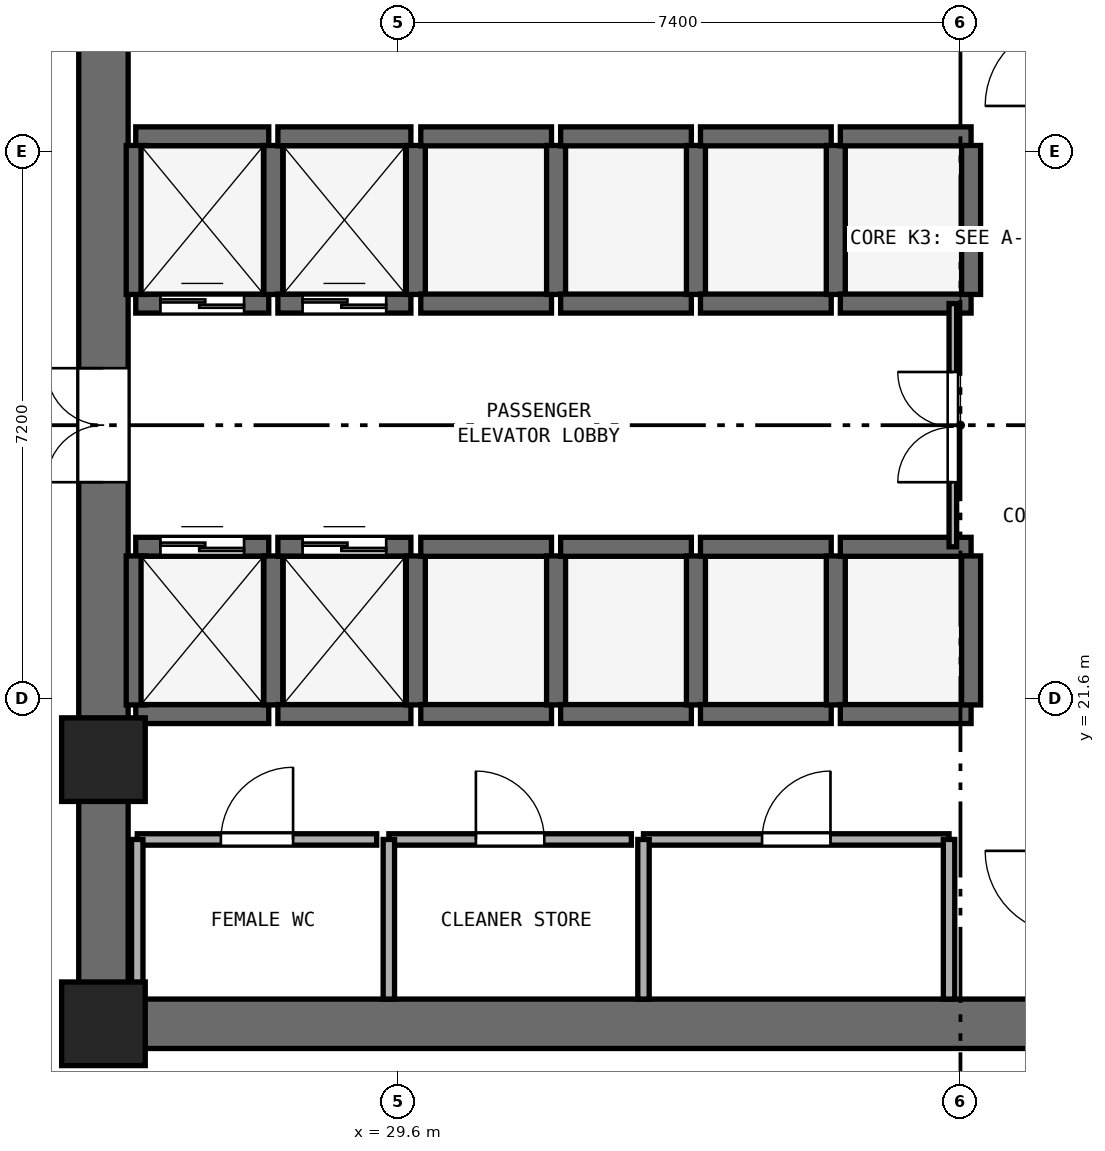
"""IFC4 building model, lengths in metres.
Left out: names, types, materials, properties, quantities, classifications, styles, units other than length and angle.
Written with IfcOpenShell. Run it as: python <this file> out.ifc"""

import sys

from ifc_helpers import new_model, si_unit, direction, frame, frame_2d, origin, origin_2d, place, context, subcontext, project, spatial, rectangle, extrude, element, fill, save


model = new_model("IFC4")
c1 = context("Model", 3, precision=1e-05, world=origin(), true_north=direction((0.0, 1.0)))
c2 = subcontext(c1, "Body", "Model", "MODEL_VIEW")
j1 = project(units=[si_unit("LENGTHUNIT", "METRE"), si_unit("PLANEANGLEUNIT", "RADIAN")], contexts=[c1])
p1 = place(None, origin())
s1 = spatial("IfcSite", under=j1, at=p1, CompositionType="ELEMENT")
p2 = place(p1, origin())
s2 = spatial("IfcBuilding", under=s1, at=p2, CompositionType="ELEMENT")
p3 = place(p2, frame((0.0, 0.0, 55.4)))
s3 = spatial("IfcBuildingStorey", under=s2, at=p3, CompositionType="ELEMENT", Elevation=55.4)
p4 = place(p3, frame((25.4, 17.325, 0.0), z_axis=(0.0, 0.0, 1.0), x_axis=(1.0, 0.0, 0.0)))
e1 = element("IfcWall", 1, at=p4, inside=s3, PredefinedType="SHEAR", context=c2, shape_type="SweptSolid", body=[
    extrude(rectangle(XDim=23.2, YDim=0.65, at=frame_2d((11.6, 0.0))), origin(), (0.0, 0.0, 1.0), 3.525),
])
p5 = place(p3, frame((25.725, 17.65, 0.0), z_axis=(0.0, 0.0, 1.0), x_axis=(0.0, 1.0, 0.0)))
e2 = element("IfcWall", 2, at=p5, inside=s3, PredefinedType="SHEAR", context=c2, shape_type="SweptSolid", body=[
    extrude(rectangle(XDim=15.1, YDim=0.65, at=frame_2d((7.55, 0.0))), origin(), (0.0, 0.0, 1.0), 3.525),
])
p6 = place(p5, frame((6.8, 0.0, 0.0)))
e3 = element("IfcOpeningElement", 3, at=p6, cuts=e2, PredefinedType="OPENING", context=c2, shape_type="SweptSolid", body=[
    extrude(rectangle(XDim=1.5, YDim=2.15, at=frame_2d((0.75, 1.075))), frame((0.0, 0.335, 0.0), z_axis=(0.0, -1.0, 0.0), x_axis=(1.0, 0.0, 0.0)), (0.0, 0.0, 1.0), 0.67),
])
for number, where, z_axis, x_axis in (
    (4, (25.725, 17.325, 0.0), (0.0, 0.0, 1.0), (1.0, 0.0, 0.0)),
    (5, (25.725, 20.8, 0.0), (0.0, 0.0, 1.0), (1.0, 0.0, 0.0)),
):
    element("IfcColumn", number, at=place(p3, frame(where, z_axis=z_axis, x_axis=x_axis)), inside=s3, PredefinedType="PILASTER", context=c2, shape_type="SweptSolid", body=[
        extrude(rectangle(XDim=1.1, YDim=1.1, at=origin_2d()), origin(), (0.0, 0.0, 1.0), 3.8),
    ])
p7 = place(p3, frame((26.15, 26.8, 0.0), z_axis=(0.0, 0.0, 1.0), x_axis=(1.0, 0.0, 0.0)))
e6 = element("IfcWall", 6, at=p7, inside=s3, PredefinedType="SHEAR", context=c2, shape_type="SweptSolid", body=[
    extrude(rectangle(XDim=1.75, YDim=0.25, at=frame_2d((0.875, 0.0))), origin(), (0.0, 0.0, 1.0), 3.525),
])
p8 = place(p7, frame((0.325, 0.0, 0.0)))
e7 = element("IfcOpeningElement", 7, at=p8, cuts=e6, PredefinedType="OPENING", context=c2, shape_type="SweptSolid", body=[
    extrude(rectangle(XDim=1.1, YDim=2.15, at=frame_2d((0.55, 1.075))), frame((0.0, 0.135, 0.0), z_axis=(0.0, -1.0, 0.0), x_axis=(1.0, 0.0, 0.0)), (0.0, 0.0, 1.0), 0.27),
])
p9 = place(p3, frame((26.15, 29.0, 0.0), z_axis=(0.0, 0.0, 1.0), x_axis=(1.0, 0.0, 0.0)))
e8 = element("IfcWall", 8, at=p9, inside=s3, PredefinedType="SHEAR", context=c2, shape_type="SweptSolid", body=[
    extrude(rectangle(XDim=1.75, YDim=0.25, at=frame_2d((0.875, 0.0))), origin(), (0.0, 0.0, 1.0), 3.525),
])
for number, where, z_axis, x_axis in (
    (9, (26.15, 26.92, 0.0), (0.0, 0.0, 1.0), (0.0, 1.0, 0.0)),
    (10, (27.96, 26.92, 0.0), (0.0, 0.0, 1.0), (0.0, 1.0, 0.0)),
):
    element("IfcWall", number, at=place(p3, frame(where, z_axis=z_axis, x_axis=x_axis)), inside=s3, PredefinedType="SHEAR", context=c2, shape_type="SweptSolid", body=[
        extrude(rectangle(XDim=1.96, YDim=0.25, at=frame_2d((0.98, 0.0))), origin(), (0.0, 0.0, 1.0), 3.525),
    ])
p10 = place(p3, frame((28.02, 26.8, 0.0), z_axis=(0.0, 0.0, 1.0), x_axis=(1.0, 0.0, 0.0)))
e11 = element("IfcWall", 11, at=p10, inside=s3, PredefinedType="SHEAR", context=c2, shape_type="SweptSolid", body=[
    extrude(rectangle(XDim=1.75, YDim=0.25, at=frame_2d((0.875, 0.0))), origin(), (0.0, 0.0, 1.0), 3.525),
])
p11 = place(p10, frame((0.325, 0.0, 0.0)))
e12 = element("IfcOpeningElement", 12, at=p11, cuts=e11, PredefinedType="OPENING", context=c2, shape_type="SweptSolid", body=[
    extrude(rectangle(XDim=1.1, YDim=2.15, at=frame_2d((0.55, 1.075))), frame((0.0, 0.135, 0.0), z_axis=(0.0, -1.0, 0.0), x_axis=(1.0, 0.0, 0.0)), (0.0, 0.0, 1.0), 0.27),
])
p12 = place(p3, frame((28.02, 29.0, 0.0), z_axis=(0.0, 0.0, 1.0), x_axis=(1.0, 0.0, 0.0)))
e13 = element("IfcWall", 13, at=p12, inside=s3, PredefinedType="SHEAR", context=c2, shape_type="SweptSolid", body=[
    extrude(rectangle(XDim=1.75, YDim=0.25, at=frame_2d((0.875, 0.0))), origin(), (0.0, 0.0, 1.0), 3.525),
])
p13 = place(p3, frame((29.835, 26.92, 0.0), z_axis=(0.0, 0.0, 1.0), x_axis=(0.0, 1.0, 0.0)))
e14 = element("IfcWall", 14, at=p13, inside=s3, PredefinedType="SHEAR", context=c2, shape_type="SweptSolid", body=[
    extrude(rectangle(XDim=1.96, YDim=0.25, at=frame_2d((0.98, 0.0))), origin(), (0.0, 0.0, 1.0), 3.525),
])
p14 = place(p3, frame((26.15, 21.4, 0.0), z_axis=(0.0, 0.0, 1.0), x_axis=(1.0, 0.0, 0.0)))
e15 = element("IfcWall", 15, at=p14, inside=s3, PredefinedType="SHEAR", context=c2, shape_type="SweptSolid", body=[
    extrude(rectangle(XDim=1.75, YDim=0.25, at=frame_2d((0.875, 0.0))), origin(), (0.0, 0.0, 1.0), 3.525),
])
p15 = place(p3, frame((26.15, 23.6, 0.0), z_axis=(0.0, 0.0, 1.0), x_axis=(1.0, 0.0, 0.0)))
e16 = element("IfcWall", 16, at=p15, inside=s3, PredefinedType="SHEAR", context=c2, shape_type="SweptSolid", body=[
    extrude(rectangle(XDim=1.75, YDim=0.25, at=frame_2d((0.875, 0.0))), origin(), (0.0, 0.0, 1.0), 3.525),
])
p16 = place(p15, frame((0.325, 0.0, 0.0)))
e17 = element("IfcOpeningElement", 17, at=p16, cuts=e16, PredefinedType="OPENING", context=c2, shape_type="SweptSolid", body=[
    extrude(rectangle(XDim=1.1, YDim=2.15, at=frame_2d((0.55, 1.075))), frame((0.0, 0.135, 0.0), z_axis=(0.0, -1.0, 0.0), x_axis=(1.0, 0.0, 0.0)), (0.0, 0.0, 1.0), 0.27),
])
for number, where, z_axis, x_axis in (
    (18, (26.15, 21.52, 0.0), (0.0, 0.0, 1.0), (0.0, 1.0, 0.0)),
    (19, (27.96, 21.52, 0.0), (0.0, 0.0, 1.0), (0.0, 1.0, 0.0)),
):
    element("IfcWall", number, at=place(p3, frame(where, z_axis=z_axis, x_axis=x_axis)), inside=s3, PredefinedType="SHEAR", context=c2, shape_type="SweptSolid", body=[
        extrude(rectangle(XDim=1.96, YDim=0.25, at=frame_2d((0.98, 0.0))), origin(), (0.0, 0.0, 1.0), 3.525),
    ])
p17 = place(p3, frame((28.02, 21.4, 0.0), z_axis=(0.0, 0.0, 1.0), x_axis=(1.0, 0.0, 0.0)))
e20 = element("IfcWall", 20, at=p17, inside=s3, PredefinedType="SHEAR", context=c2, shape_type="SweptSolid", body=[
    extrude(rectangle(XDim=1.75, YDim=0.25, at=frame_2d((0.875, 0.0))), origin(), (0.0, 0.0, 1.0), 3.525),
])
p18 = place(p3, frame((28.02, 23.6, 0.0), z_axis=(0.0, 0.0, 1.0), x_axis=(1.0, 0.0, 0.0)))
e21 = element("IfcWall", 21, at=p18, inside=s3, PredefinedType="SHEAR", context=c2, shape_type="SweptSolid", body=[
    extrude(rectangle(XDim=1.75, YDim=0.25, at=frame_2d((0.875, 0.0))), origin(), (0.0, 0.0, 1.0), 3.525),
])
p19 = place(p18, frame((0.325, 0.0, 0.0)))
e22 = element("IfcOpeningElement", 22, at=p19, cuts=e21, PredefinedType="OPENING", context=c2, shape_type="SweptSolid", body=[
    extrude(rectangle(XDim=1.1, YDim=2.15, at=frame_2d((0.55, 1.075))), frame((0.0, 0.135, 0.0), z_axis=(0.0, -1.0, 0.0), x_axis=(1.0, 0.0, 0.0)), (0.0, 0.0, 1.0), 0.27),
])
p20 = place(p3, frame((29.835, 21.52, 0.0), z_axis=(0.0, 0.0, 1.0), x_axis=(0.0, 1.0, 0.0)))
e23 = element("IfcWall", 23, at=p20, inside=s3, PredefinedType="SHEAR", context=c2, shape_type="SweptSolid", body=[
    extrude(rectangle(XDim=1.96, YDim=0.25, at=frame_2d((0.98, 0.0))), origin(), (0.0, 0.0, 1.0), 3.525),
])
for number, where, z_axis, x_axis in (
    (24, (29.9, 21.4, 0.0), (0.0, 0.0, 1.0), (1.0, 0.0, 0.0)),
    (25, (29.9, 23.6, 0.0), (0.0, 0.0, 1.0), (1.0, 0.0, 0.0)),
):
    element("IfcWall", number, at=place(p3, frame(where, z_axis=z_axis, x_axis=x_axis)), inside=s3, PredefinedType="SHEAR", context=c2, shape_type="SweptSolid", body=[
        extrude(rectangle(XDim=1.72, YDim=0.25, at=frame_2d((0.86, 0.0))), origin(), (0.0, 0.0, 1.0), 3.525),
    ])
p21 = place(p3, frame((31.68, 21.52, 0.0), z_axis=(0.0, 0.0, 1.0), x_axis=(0.0, 1.0, 0.0)))
e26 = element("IfcWall", 26, at=p21, inside=s3, PredefinedType="SHEAR", context=c2, shape_type="SweptSolid", body=[
    extrude(rectangle(XDim=1.96, YDim=0.25, at=frame_2d((0.98, 0.0))), origin(), (0.0, 0.0, 1.0), 3.525),
])
for number, where, z_axis, x_axis in (
    (27, (31.74, 21.4, 0.0), (0.0, 0.0, 1.0), (1.0, 0.0, 0.0)),
    (28, (31.74, 23.6, 0.0), (0.0, 0.0, 1.0), (1.0, 0.0, 0.0)),
):
    element("IfcWall", number, at=place(p3, frame(where, z_axis=z_axis, x_axis=x_axis)), inside=s3, PredefinedType="SHEAR", context=c2, shape_type="SweptSolid", body=[
        extrude(rectangle(XDim=1.72, YDim=0.25, at=frame_2d((0.86, 0.0))), origin(), (0.0, 0.0, 1.0), 3.525),
    ])
p22 = place(p3, frame((33.52, 21.52, 0.0), z_axis=(0.0, 0.0, 1.0), x_axis=(0.0, 1.0, 0.0)))
e29 = element("IfcWall", 29, at=p22, inside=s3, PredefinedType="SHEAR", context=c2, shape_type="SweptSolid", body=[
    extrude(rectangle(XDim=1.96, YDim=0.25, at=frame_2d((0.98, 0.0))), origin(), (0.0, 0.0, 1.0), 3.525),
])
for number, where, z_axis, x_axis in (
    (30, (33.58, 21.4, 0.0), (0.0, 0.0, 1.0), (1.0, 0.0, 0.0)),
    (31, (33.58, 23.6, 0.0), (0.0, 0.0, 1.0), (1.0, 0.0, 0.0)),
):
    element("IfcWall", number, at=place(p3, frame(where, z_axis=z_axis, x_axis=x_axis)), inside=s3, PredefinedType="SHEAR", context=c2, shape_type="SweptSolid", body=[
        extrude(rectangle(XDim=1.72, YDim=0.25, at=frame_2d((0.86, 0.0))), origin(), (0.0, 0.0, 1.0), 3.525),
    ])
p23 = place(p3, frame((35.36, 21.52, 0.0), z_axis=(0.0, 0.0, 1.0), x_axis=(0.0, 1.0, 0.0)))
e32 = element("IfcWall", 32, at=p23, inside=s3, PredefinedType="SHEAR", context=c2, shape_type="SweptSolid", body=[
    extrude(rectangle(XDim=1.96, YDim=0.25, at=frame_2d((0.98, 0.0))), origin(), (0.0, 0.0, 1.0), 3.525),
])
for number, where, z_axis, x_axis in (
    (33, (35.42, 21.4, 0.0), (0.0, 0.0, 1.0), (1.0, 0.0, 0.0)),
    (34, (35.42, 23.6, 0.0), (0.0, 0.0, 1.0), (1.0, 0.0, 0.0)),
):
    element("IfcWall", number, at=place(p3, frame(where, z_axis=z_axis, x_axis=x_axis)), inside=s3, PredefinedType="SHEAR", context=c2, shape_type="SweptSolid", body=[
        extrude(rectangle(XDim=1.72, YDim=0.25, at=frame_2d((0.86, 0.0))), origin(), (0.0, 0.0, 1.0), 3.525),
    ])
p24 = place(p3, frame((37.14, 21.52, 0.0), z_axis=(0.0, 0.0, 1.0), x_axis=(0.0, 1.0, 0.0)))
e35 = element("IfcWall", 35, at=p24, inside=s3, PredefinedType="SHEAR", context=c2, shape_type="SweptSolid", body=[
    extrude(rectangle(XDim=1.96, YDim=0.25, at=frame_2d((0.98, 0.0))), origin(), (0.0, 0.0, 1.0), 3.525),
])
for number, where, z_axis, x_axis in (
    (36, (29.9, 26.8, 0.0), (0.0, 0.0, 1.0), (1.0, 0.0, 0.0)),
    (37, (29.9, 29.0, 0.0), (0.0, 0.0, 1.0), (1.0, 0.0, 0.0)),
):
    element("IfcWall", number, at=place(p3, frame(where, z_axis=z_axis, x_axis=x_axis)), inside=s3, PredefinedType="SHEAR", context=c2, shape_type="SweptSolid", body=[
        extrude(rectangle(XDim=1.72, YDim=0.25, at=frame_2d((0.86, 0.0))), origin(), (0.0, 0.0, 1.0), 3.525),
    ])
p25 = place(p3, frame((31.68, 26.92, 0.0), z_axis=(0.0, 0.0, 1.0), x_axis=(0.0, 1.0, 0.0)))
e38 = element("IfcWall", 38, at=p25, inside=s3, PredefinedType="SHEAR", context=c2, shape_type="SweptSolid", body=[
    extrude(rectangle(XDim=1.96, YDim=0.25, at=frame_2d((0.98, 0.0))), origin(), (0.0, 0.0, 1.0), 3.525),
])
for number, where, z_axis, x_axis in (
    (39, (31.74, 26.8, 0.0), (0.0, 0.0, 1.0), (1.0, 0.0, 0.0)),
    (40, (31.74, 29.0, 0.0), (0.0, 0.0, 1.0), (1.0, 0.0, 0.0)),
):
    element("IfcWall", number, at=place(p3, frame(where, z_axis=z_axis, x_axis=x_axis)), inside=s3, PredefinedType="SHEAR", context=c2, shape_type="SweptSolid", body=[
        extrude(rectangle(XDim=1.72, YDim=0.25, at=frame_2d((0.86, 0.0))), origin(), (0.0, 0.0, 1.0), 3.525),
    ])
p26 = place(p3, frame((33.52, 26.92, 0.0), z_axis=(0.0, 0.0, 1.0), x_axis=(0.0, 1.0, 0.0)))
e41 = element("IfcWall", 41, at=p26, inside=s3, PredefinedType="SHEAR", context=c2, shape_type="SweptSolid", body=[
    extrude(rectangle(XDim=1.96, YDim=0.25, at=frame_2d((0.98, 0.0))), origin(), (0.0, 0.0, 1.0), 3.525),
])
for number, where, z_axis, x_axis in (
    (42, (33.58, 26.8, 0.0), (0.0, 0.0, 1.0), (1.0, 0.0, 0.0)),
    (43, (33.58, 29.0, 0.0), (0.0, 0.0, 1.0), (1.0, 0.0, 0.0)),
):
    element("IfcWall", number, at=place(p3, frame(where, z_axis=z_axis, x_axis=x_axis)), inside=s3, PredefinedType="SHEAR", context=c2, shape_type="SweptSolid", body=[
        extrude(rectangle(XDim=1.72, YDim=0.25, at=frame_2d((0.86, 0.0))), origin(), (0.0, 0.0, 1.0), 3.525),
    ])
p27 = place(p3, frame((35.36, 26.92, 0.0), z_axis=(0.0, 0.0, 1.0), x_axis=(0.0, 1.0, 0.0)))
e44 = element("IfcWall", 44, at=p27, inside=s3, PredefinedType="SHEAR", context=c2, shape_type="SweptSolid", body=[
    extrude(rectangle(XDim=1.96, YDim=0.25, at=frame_2d((0.98, 0.0))), origin(), (0.0, 0.0, 1.0), 3.525),
])
for number, where, z_axis, x_axis in (
    (45, (35.42, 26.8, 0.0), (0.0, 0.0, 1.0), (1.0, 0.0, 0.0)),
    (46, (35.42, 29.0, 0.0), (0.0, 0.0, 1.0), (1.0, 0.0, 0.0)),
):
    element("IfcWall", number, at=place(p3, frame(where, z_axis=z_axis, x_axis=x_axis)), inside=s3, PredefinedType="SHEAR", context=c2, shape_type="SweptSolid", body=[
        extrude(rectangle(XDim=1.72, YDim=0.25, at=frame_2d((0.86, 0.0))), origin(), (0.0, 0.0, 1.0), 3.525),
    ])
p28 = place(p3, frame((37.14, 26.92, 0.0), z_axis=(0.0, 0.0, 1.0), x_axis=(0.0, 1.0, 0.0)))
e47 = element("IfcWall", 47, at=p28, inside=s3, PredefinedType="SHEAR", context=c2, shape_type="SweptSolid", body=[
    extrude(rectangle(XDim=1.96, YDim=0.25, at=frame_2d((0.98, 0.0))), origin(), (0.0, 0.0, 1.0), 3.525),
])
p29 = place(p3, frame((26.17, 19.75, 0.0), z_axis=(0.0, 0.0, 1.0), x_axis=(1.0, 0.0, 0.0)))
e48 = element("IfcWall", 48, at=p29, inside=s3, PredefinedType="PARTITIONING", context=c2, shape_type="SweptSolid", body=[
    extrude(rectangle(XDim=3.15, YDim=0.15, at=frame_2d((1.575, 0.0))), origin(), (0.0, 0.0, 1.0), 3.525),
])
p30 = place(p29, frame((1.1, 0.0, 0.0)))
e49 = element("IfcOpeningElement", 49, at=p30, cuts=e48, PredefinedType="OPENING", context=c2, shape_type="SweptSolid", body=[
    extrude(rectangle(XDim=0.95, YDim=2.1, at=frame_2d((0.475, 1.05))), frame((0.0, 0.085, 0.0), z_axis=(0.0, -1.0, 0.0), x_axis=(1.0, 0.0, 0.0)), (0.0, 0.0, 1.0), 0.17),
])
p31 = place(p3, frame((26.17, 17.65, 0.0), z_axis=(0.0, 0.0, 1.0), x_axis=(0.0, 1.0, 0.0)))
e50 = element("IfcWall", 50, at=p31, inside=s3, PredefinedType="PARTITIONING", context=c2, shape_type="SweptSolid", body=[
    extrude(rectangle(XDim=2.1, YDim=0.15, at=frame_2d((1.05, 0.0))), origin(), (0.0, 0.0, 1.0), 3.525),
])
p32 = place(p3, frame((29.48, 19.75, 0.0), z_axis=(0.0, 0.0, 1.0), x_axis=(1.0, 0.0, 0.0)))
e51 = element("IfcWall", 51, at=p32, inside=s3, PredefinedType="PARTITIONING", context=c2, shape_type="SweptSolid", body=[
    extrude(rectangle(XDim=3.19, YDim=0.15, at=frame_2d((1.595, 0.0))), origin(), (0.0, 0.0, 1.0), 3.525),
])
p33 = place(p32, frame((1.145, 0.0, 0.0)))
e52 = element("IfcOpeningElement", 52, at=p33, cuts=e51, PredefinedType="OPENING", context=c2, shape_type="SweptSolid", body=[
    extrude(rectangle(XDim=0.9, YDim=2.1, at=frame_2d((0.45, 1.05))), frame((0.0, 0.085, 0.0), z_axis=(0.0, -1.0, 0.0), x_axis=(1.0, 0.0, 0.0)), (0.0, 0.0, 1.0), 0.17),
])
p34 = place(p3, frame((29.48, 17.65, 0.0), z_axis=(0.0, 0.0, 1.0), x_axis=(0.0, 1.0, 0.0)))
e53 = element("IfcWall", 53, at=p34, inside=s3, PredefinedType="PARTITIONING", context=c2, shape_type="SweptSolid", body=[
    extrude(rectangle(XDim=2.1, YDim=0.15, at=frame_2d((1.05, 0.0))), origin(), (0.0, 0.0, 1.0), 3.525),
])
p35 = place(p3, frame((32.83, 19.75, 0.0), z_axis=(0.0, 0.0, 1.0), x_axis=(1.0, 0.0, 0.0)))
e54 = element("IfcWall", 54, at=p35, inside=s3, PredefinedType="PARTITIONING", context=c2, shape_type="SweptSolid", body=[
    extrude(rectangle(XDim=4.02, YDim=0.15, at=frame_2d((2.01, 0.0))), origin(), (0.0, 0.0, 1.0), 3.525),
])
p36 = place(p35, frame((1.56, 0.0, 0.0)))
e55 = element("IfcOpeningElement", 55, at=p36, cuts=e54, PredefinedType="OPENING", context=c2, shape_type="SweptSolid", body=[
    extrude(rectangle(XDim=0.9, YDim=2.1, at=frame_2d((0.45, 1.05))), frame((0.0, 0.085, 0.0), z_axis=(0.0, -1.0, 0.0), x_axis=(1.0, 0.0, 0.0)), (0.0, 0.0, 1.0), 0.17),
])
for number, where, z_axis, x_axis in (
    (56, (32.83, 17.65, 0.0), (0.0, 0.0, 1.0), (0.0, 1.0, 0.0)),
    (57, (36.85, 17.65, 0.0), (0.0, 0.0, 1.0), (0.0, 1.0, 0.0)),
):
    element("IfcWall", number, at=place(p3, frame(where, z_axis=z_axis, x_axis=x_axis)), inside=s3, PredefinedType="PARTITIONING", context=c2, shape_type="SweptSolid", body=[
        extrude(rectangle(XDim=2.1, YDim=0.15, at=frame_2d((1.05, 0.0))), origin(), (0.0, 0.0, 1.0), 3.525),
    ])
p37 = place(p3, frame((36.9, 23.6, 0.0), z_axis=(0.0, 0.0, 1.0), x_axis=(0.0, 1.0, 0.0)))
e58 = element("IfcWall", 58, at=p37, inside=s3, PredefinedType="PARTITIONING", context=c2, shape_type="SweptSolid", body=[
    extrude(rectangle(XDim=3.2, YDim=0.1, at=frame_2d((1.6, 0.0))), origin(), (0.0, 0.0, 1.0), 3.525),
])
p38 = place(p37, frame((0.85, 0.0, 0.0)))
e59 = element("IfcOpeningElement", 59, at=p38, cuts=e58, PredefinedType="OPENING", context=c2, shape_type="SweptSolid", body=[
    extrude(rectangle(XDim=1.45, YDim=2.12, at=frame_2d((0.725, 1.06))), frame((0.0, 0.06, 0.0), z_axis=(0.0, -1.0, 0.0), x_axis=(1.0, 0.0, 0.0)), (0.0, 0.0, 1.0), 0.12),
])
p39 = place(p8, origin())
e60 = element("IfcDoor", 60, at=p39, inside=s3, OperationType="DOUBLE_DOOR_SLIDING", PredefinedType="DOOR", context=c2, shape_type="SweptSolid", body=[
    extrude(rectangle(XDim=1.1, YDim=2.15, at=frame_2d((0.55, 1.075))), frame((0.0, 0.025, 0.0), z_axis=(0.0, -1.0, 0.0), x_axis=(1.0, 0.0, 0.0)), (0.0, 0.0, 1.0), 0.05),
])
fill(e7, e60)
p40 = place(p11, origin())
e61 = element("IfcDoor", 61, at=p40, inside=s3, OperationType="DOUBLE_DOOR_SLIDING", PredefinedType="DOOR", context=c2, shape_type="SweptSolid", body=[
    extrude(rectangle(XDim=1.1, YDim=2.15, at=frame_2d((0.55, 1.075))), frame((0.0, 0.025, 0.0), z_axis=(0.0, -1.0, 0.0), x_axis=(1.0, 0.0, 0.0)), (0.0, 0.0, 1.0), 0.05),
])
fill(e12, e61)
p41 = place(p16, origin())
e62 = element("IfcDoor", 62, at=p41, inside=s3, OperationType="DOUBLE_DOOR_SLIDING", PredefinedType="DOOR", context=c2, shape_type="SweptSolid", body=[
    extrude(rectangle(XDim=1.1, YDim=2.15, at=frame_2d((0.55, 1.075))), frame((0.0, 0.025, 0.0), z_axis=(0.0, -1.0, 0.0), x_axis=(1.0, 0.0, 0.0)), (0.0, 0.0, 1.0), 0.05),
])
fill(e17, e62)
p42 = place(p19, origin())
e63 = element("IfcDoor", 63, at=p42, inside=s3, OperationType="DOUBLE_DOOR_SLIDING", PredefinedType="DOOR", context=c2, shape_type="SweptSolid", body=[
    extrude(rectangle(XDim=1.1, YDim=2.15, at=frame_2d((0.55, 1.075))), frame((0.0, 0.025, 0.0), z_axis=(0.0, -1.0, 0.0), x_axis=(1.0, 0.0, 0.0)), (0.0, 0.0, 1.0), 0.05),
])
fill(e22, e63)
p43 = place(p6, origin())
e64 = element("IfcDoor", 64, at=p43, inside=s3, OperationType="DOUBLE_DOOR_SINGLE_SWING", PredefinedType="DOOR", context=c2, shape_type="SweptSolid", body=[
    extrude(rectangle(XDim=1.5, YDim=2.15, at=frame_2d((0.75, 1.075))), frame((0.0, 0.025, 0.0), z_axis=(0.0, -1.0, 0.0), x_axis=(1.0, 0.0, 0.0)), (0.0, 0.0, 1.0), 0.05),
])
fill(e3, e64)
p44 = place(p30, origin())
e65 = element("IfcDoor", 65, at=p44, inside=s3, OperationType="SINGLE_SWING_RIGHT", PredefinedType="DOOR", context=c2, shape_type="SweptSolid", body=[
    extrude(rectangle(XDim=0.95, YDim=2.1, at=frame_2d((0.475, 1.05))), frame((0.0, 0.025, 0.0), z_axis=(0.0, -1.0, 0.0), x_axis=(1.0, 0.0, 0.0)), (0.0, 0.0, 1.0), 0.05),
])
fill(e49, e65)
p45 = place(p33, origin())
e66 = element("IfcDoor", 66, at=p45, inside=s3, OperationType="SINGLE_SWING_LEFT", PredefinedType="DOOR", context=c2, shape_type="SweptSolid", body=[
    extrude(rectangle(XDim=0.9, YDim=2.1, at=frame_2d((0.45, 1.05))), frame((0.0, 0.025, 0.0), z_axis=(0.0, -1.0, 0.0), x_axis=(1.0, 0.0, 0.0)), (0.0, 0.0, 1.0), 0.05),
])
fill(e52, e66)
p46 = place(p36, origin())
e67 = element("IfcDoor", 67, at=p46, inside=s3, OperationType="SINGLE_SWING_RIGHT", PredefinedType="DOOR", context=c2, shape_type="SweptSolid", body=[
    extrude(rectangle(XDim=0.9, YDim=2.1, at=frame_2d((0.45, 1.05))), frame((0.0, 0.025, 0.0), z_axis=(0.0, -1.0, 0.0), x_axis=(1.0, 0.0, 0.0)), (0.0, 0.0, 1.0), 0.05),
])
fill(e55, e67)
p47 = place(p38, origin())
e68 = element("IfcDoor", 68, at=p47, inside=s3, OperationType="DOUBLE_DOOR_SINGLE_SWING", PredefinedType="DOOR", context=c2, shape_type="SweptSolid", body=[
    extrude(rectangle(XDim=1.45, YDim=2.12, at=frame_2d((0.725, 1.06))), frame((0.0, 0.025, 0.0), z_axis=(0.0, -1.0, 0.0), x_axis=(1.0, 0.0, 0.0)), (0.0, 0.0, 1.0), 0.05),
])
fill(e59, e68)
save(model, sys.argv[1])
